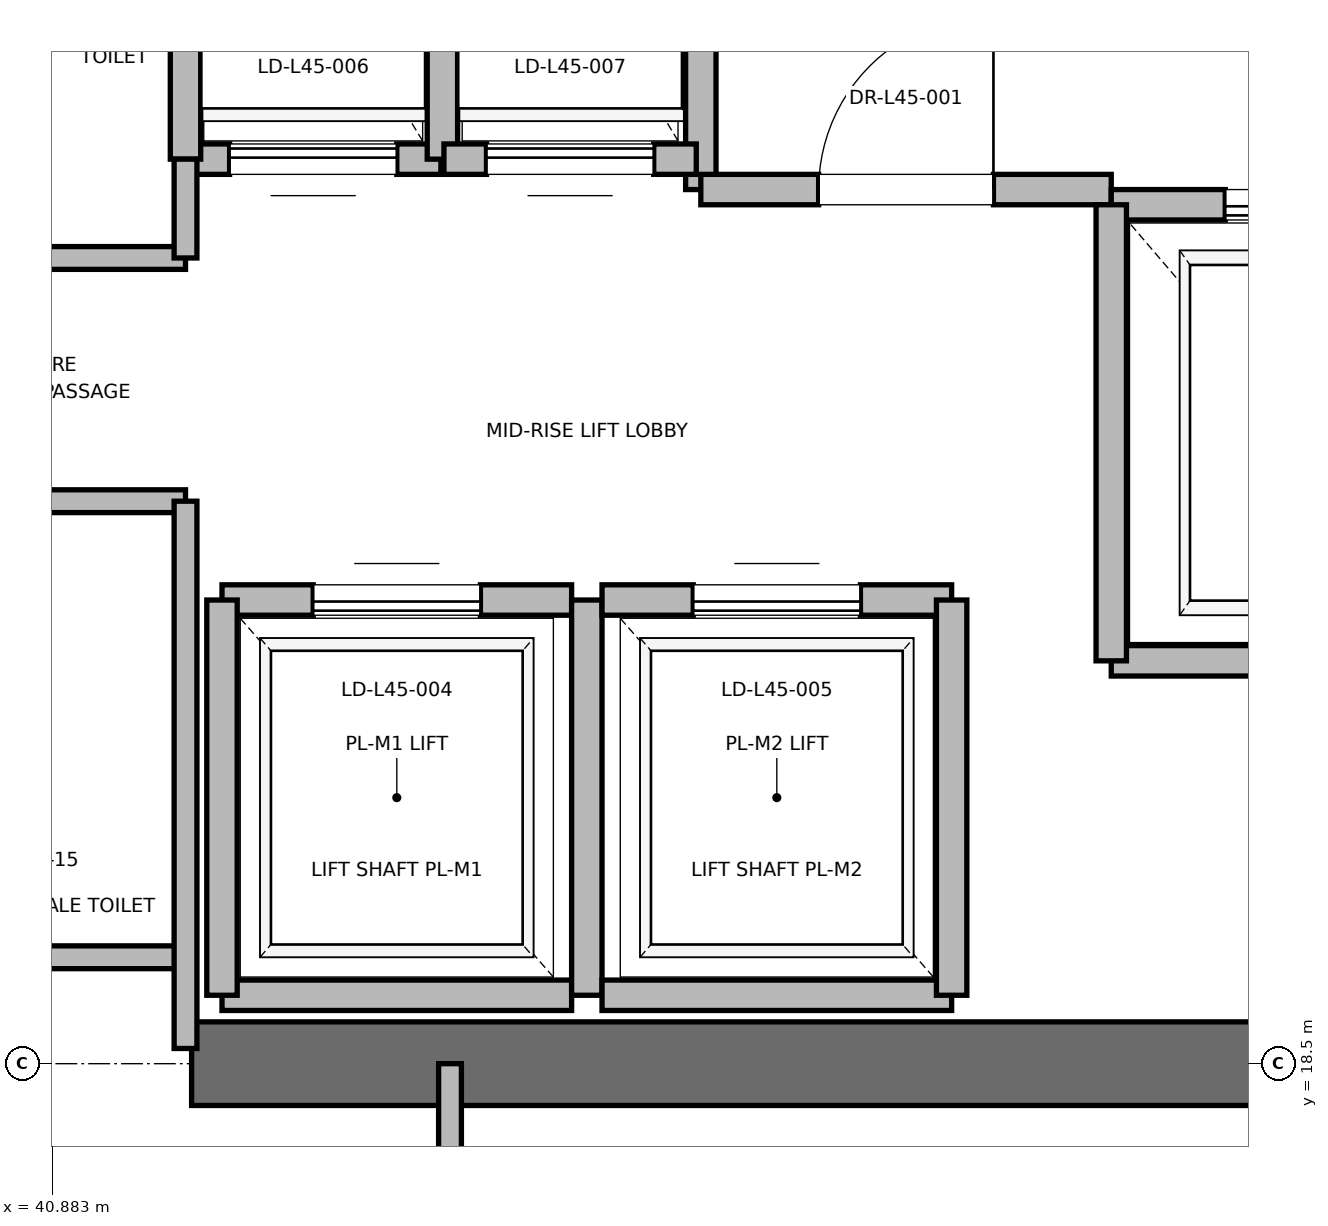
"""IFC4 building model, lengths in metres.
Left out: names, types, materials, properties, quantities, classifications, styles, units other than length and angle.
Written with IfcOpenShell. Run it as: python <this file> out.ifc"""

import sys

from ifc_helpers import new_model, si_unit, direction, frame, frame_2d, origin, place, context, subcontext, project, spatial, rectangle, extrude, element, fill, save


model = new_model("IFC4")
c1 = context("Model", 3, precision=1e-05, world=origin(), true_north=direction((0.0, 1.0)))
c2 = subcontext(c1, "Body", "Model", "MODEL_VIEW")
j1 = project(units=[si_unit("LENGTHUNIT", "METRE"), si_unit("PLANEANGLEUNIT", "RADIAN")], contexts=[c1])
p1 = place(None, origin())
s1 = spatial("IfcSite", under=j1, at=p1, CompositionType="ELEMENT")
p2 = place(p1, origin())
s2 = spatial("IfcBuilding", under=s1, at=p2, CompositionType="ELEMENT")
p3 = place(p2, frame((0.0, 0.0, 194.8)))
s3 = spatial("IfcBuildingStorey", under=s2, at=p3, CompositionType="ELEMENT", Elevation=194.8)
p4 = place(p3, frame((41.8, 18.5, 0.0), z_axis=(0.0, 0.0, 1.0), x_axis=(1.0, 0.0, 0.0)))
e1 = element("IfcWall", 1, at=p4, inside=s3, PredefinedType="SHEAR", context=c2, shape_type="SweptSolid", body=[
    extrude(rectangle(XDim=9.2, YDim=0.55, at=frame_2d((4.6, 0.0))), origin(), (0.0, 0.0, 1.0), 5.1),
])
p5 = place(p3, frame((45.15, 24.25, 0.0), z_axis=(0.0, 0.0, 1.0), x_axis=(0.0, 1.0, 0.0)))
e2 = element("IfcWall", 2, at=p5, inside=s3, PredefinedType="PARTITIONING", context=c2, shape_type="SweptSolid", body=[
    extrude(rectangle(XDim=3.37, YDim=0.2, at=frame_2d((1.685, 0.0))), origin(), (0.0, 0.0, 1.0), 5.1),
])
p6 = place(p3, frame((45.15, 24.25, 0.0), z_axis=(0.0, 0.0, 1.0), x_axis=(1.0, 0.0, 0.0)))
e3 = element("IfcWall", 3, at=p6, inside=s3, PredefinedType="PARTITIONING", context=c2, shape_type="SweptSolid", body=[
    extrude(rectangle(XDim=2.7, YDim=0.2, at=frame_2d((1.35, 0.0))), origin(), (0.0, 0.0, 1.0), 5.1),
])
p7 = place(p6, frame((0.775, 0.0, 0.0)))
e4 = element("IfcOpeningElement", 4, at=p7, cuts=e3, PredefinedType="OPENING", context=c2, shape_type="SweptSolid", body=[
    extrude(rectangle(XDim=1.15, YDim=2.2, at=frame_2d((0.575, 1.1))), frame((0.0, 0.1, 0.0), z_axis=(0.0, -1.0, 0.0), x_axis=(1.0, 0.0, 0.0)), (0.0, 0.0, 1.0), 0.2),
])
p8 = place(p3, frame((47.85, 21.15, 0.0), z_axis=(0.0, 0.0, 1.0), x_axis=(1.0, 0.0, 0.0)))
e5 = element("IfcWall", 5, at=p8, inside=s3, PredefinedType="SOLIDWALL", context=c2, shape_type="SweptSolid", body=[
    extrude(rectangle(XDim=2.6, YDim=0.2, at=frame_2d((1.3, 0.0))), origin(), (0.0, 0.0, 1.0), 5.1),
])
p9 = place(p3, frame((50.45, 24.15, 0.0), z_axis=(0.0, 0.0, 1.0), x_axis=(-1.0, 0.0, 0.0)))
e6 = element("IfcWall", 6, at=p9, inside=s3, PredefinedType="SOLIDWALL", context=c2, shape_type="SweptSolid", body=[
    extrude(rectangle(XDim=2.6, YDim=0.2, at=frame_2d((1.3, 0.0))), origin(), (0.0, 0.0, 1.0), 4.08),
])
p10 = place(p9, frame((0.75, 0.0, 0.0)))
e7 = element("IfcOpeningElement", 7, at=p10, cuts=e6, PredefinedType="OPENING", context=c2, shape_type="SweptSolid", body=[
    extrude(rectangle(XDim=1.1, YDim=2.2, at=frame_2d((0.55, 1.1))), frame((0.0, 0.1, 0.0), z_axis=(0.0, -1.0, 0.0), x_axis=(1.0, 0.0, 0.0)), (0.0, 0.0, 1.0), 0.2),
])
p11 = place(p3, frame((47.85, 24.15, 0.0), z_axis=(0.0, 0.0, 1.0), x_axis=(0.0, -1.0, 0.0)))
e8 = element("IfcWall", 8, at=p11, inside=s3, PredefinedType="SOLIDWALL", context=c2, shape_type="SweptSolid", body=[
    extrude(rectangle(XDim=3.0, YDim=0.2, at=frame_2d((1.5, 0.0))), origin(), (0.0, 0.0, 1.0), 5.1),
])
p12 = place(p3, frame((42.0, 18.95, 0.0), z_axis=(0.0, 0.0, 1.0), x_axis=(1.0, 0.0, 0.0)))
e9 = element("IfcWall", 9, at=p12, inside=s3, PredefinedType="SOLIDWALL", context=c2, shape_type="SweptSolid", body=[
    extrude(rectangle(XDim=2.3, YDim=0.2, at=frame_2d((1.15, 0.0))), origin(), (0.0, 0.0, 1.0), 4.08),
])
p13 = place(p3, frame((44.3, 21.55, 0.0), z_axis=(0.0, 0.0, 1.0), x_axis=(-1.0, 0.0, 0.0)))
e10 = element("IfcWall", 10, at=p13, inside=s3, PredefinedType="SOLIDWALL", context=c2, shape_type="SweptSolid", body=[
    extrude(rectangle(XDim=2.3, YDim=0.2, at=frame_2d((1.15, 0.0))), origin(), (0.0, 0.0, 1.0), 5.1),
])
p14 = place(p13, frame((0.6, 0.0, 0.0)))
e11 = element("IfcOpeningElement", 11, at=p14, cuts=e10, PredefinedType="OPENING", context=c2, shape_type="SweptSolid", body=[
    extrude(rectangle(XDim=1.1, YDim=2.2, at=frame_2d((0.55, 1.1))), frame((0.0, 0.1, 0.0), z_axis=(0.0, -1.0, 0.0), x_axis=(1.0, 0.0, 0.0)), (0.0, 0.0, 1.0), 0.2),
])
p15 = place(p3, frame((42.0, 21.55, 0.0), z_axis=(0.0, 0.0, 1.0), x_axis=(0.0, -1.0, 0.0)))
e12 = element("IfcWall", 12, at=p15, inside=s3, PredefinedType="SOLIDWALL", context=c2, shape_type="SweptSolid", body=[
    extrude(rectangle(XDim=2.6, YDim=0.2, at=frame_2d((1.3, 0.0))), origin(), (0.0, 0.0, 1.0), 4.08),
])
p16 = place(p3, frame((44.4, 18.95, 0.0), z_axis=(0.0, 0.0, 1.0), x_axis=(0.0, 1.0, 0.0)))
e13 = element("IfcWall", 13, at=p16, inside=s3, PredefinedType="SOLIDWALL", context=c2, shape_type="SweptSolid", body=[
    extrude(rectangle(XDim=2.6, YDim=0.2, at=frame_2d((1.3, 0.0))), origin(), (0.0, 0.0, 1.0), 5.1),
])
p17 = place(p3, frame((44.5, 18.95, 0.0), z_axis=(0.0, 0.0, 1.0), x_axis=(1.0, 0.0, 0.0)))
e14 = element("IfcWall", 14, at=p17, inside=s3, PredefinedType="SOLIDWALL", context=c2, shape_type="SweptSolid", body=[
    extrude(rectangle(XDim=2.3, YDim=0.2, at=frame_2d((1.15, 0.0))), origin(), (0.0, 0.0, 1.0), 5.1),
])
p18 = place(p3, frame((46.8, 21.55, 0.0), z_axis=(0.0, 0.0, 1.0), x_axis=(-1.0, 0.0, 0.0)))
e15 = element("IfcWall", 15, at=p18, inside=s3, PredefinedType="SOLIDWALL", context=c2, shape_type="SweptSolid", body=[
    extrude(rectangle(XDim=2.3, YDim=0.2, at=frame_2d((1.15, 0.0))), origin(), (0.0, 0.0, 1.0), 5.1),
])
p19 = place(p18, frame((0.6, 0.0, 0.0)))
e16 = element("IfcOpeningElement", 16, at=p19, cuts=e15, PredefinedType="OPENING", context=c2, shape_type="SweptSolid", body=[
    extrude(rectangle(XDim=1.1, YDim=2.2, at=frame_2d((0.55, 1.1))), frame((0.0, 0.1, 0.0), z_axis=(0.0, -1.0, 0.0), x_axis=(1.0, 0.0, 0.0)), (0.0, 0.0, 1.0), 0.2),
])
p20 = place(p3, frame((46.8, 18.95, 0.0), z_axis=(0.0, 0.0, 1.0), x_axis=(0.0, 1.0, 0.0)))
e17 = element("IfcWall", 17, at=p20, inside=s3, PredefinedType="SOLIDWALL", context=c2, shape_type="SweptSolid", body=[
    extrude(rectangle(XDim=2.6, YDim=0.2, at=frame_2d((1.3, 0.0))), origin(), (0.0, 0.0, 1.0), 5.1),
])
p21 = place(p3, frame((41.76, 24.45, 0.0), z_axis=(0.0, 0.0, 1.0), x_axis=(1.0, 0.0, 0.0)))
e18 = element("IfcWall", 18, at=p21, inside=s3, PredefinedType="SOLIDWALL", context=c2, shape_type="SweptSolid", body=[
    extrude(rectangle(XDim=1.68, YDim=0.2, at=frame_2d((0.84, 0.0))), origin(), (0.0, 0.0, 1.0), 5.1),
])
p22 = place(p21, frame((0.29, 0.0, 0.0)))
e19 = element("IfcOpeningElement", 19, at=p22, cuts=e18, PredefinedType="OPENING", context=c2, shape_type="SweptSolid", body=[
    extrude(rectangle(XDim=1.1, YDim=2.2, at=frame_2d((0.55, 1.1))), frame((0.0, 0.1, 0.0), z_axis=(0.0, -1.0, 0.0), x_axis=(1.0, 0.0, 0.0)), (0.0, 0.0, 1.0), 0.2),
])
for number, where, z_axis, x_axis in (
    (20, (41.76, 27.05, 0.0), (0.0, 0.0, 1.0), (0.0, -1.0, 0.0)),
    (21, (43.45, 24.45, 0.0), (0.0, 0.0, 1.0), (0.0, 1.0, 0.0)),
):
    element("IfcWall", number, at=place(p3, frame(where, z_axis=z_axis, x_axis=x_axis)), inside=s3, PredefinedType="SOLIDWALL", context=c2, shape_type="SweptSolid", body=[
        extrude(rectangle(XDim=2.6, YDim=0.2, at=frame_2d((1.3, 0.0))), origin(), (0.0, 0.0, 1.0), 5.1),
    ])
p23 = place(p3, frame((43.46, 24.45, 0.0), z_axis=(0.0, 0.0, 1.0), x_axis=(1.0, 0.0, 0.0)))
e22 = element("IfcWall", 22, at=p23, inside=s3, PredefinedType="SOLIDWALL", context=c2, shape_type="SweptSolid", body=[
    extrude(rectangle(XDim=1.66, YDim=0.2, at=frame_2d((0.83, 0.0))), origin(), (0.0, 0.0, 1.0), 5.1),
])
p24 = place(p23, frame((0.28, 0.0, 0.0)))
e23 = element("IfcOpeningElement", 23, at=p24, cuts=e22, PredefinedType="OPENING", context=c2, shape_type="SweptSolid", body=[
    extrude(rectangle(XDim=1.1, YDim=2.2, at=frame_2d((0.55, 1.1))), frame((0.0, 0.1, 0.0), z_axis=(0.0, -1.0, 0.0), x_axis=(1.0, 0.0, 0.0)), (0.0, 0.0, 1.0), 0.2),
])
for number, where, z_axis, x_axis in (
    (24, (39.95, 19.2, 0.0), (0.0, 0.0, 1.0), (1.0, 0.0, 0.0)),
    (25, (39.95, 22.2, 0.0), (0.0, 0.0, 1.0), (1.0, 0.0, 0.0)),
    (26, (39.95, 23.8, 0.0), (0.0, 0.0, 1.0), (1.0, 0.0, 0.0)),
):
    element("IfcWall", number, at=place(p3, frame(where, z_axis=z_axis, x_axis=x_axis)), inside=s3, PredefinedType="PARTITIONING", context=c2, shape_type="SweptSolid", body=[
        extrude(rectangle(XDim=1.81, YDim=0.15, at=frame_2d((0.905, 0.0))), origin(), (0.0, 0.0, 1.0), 2.85),
    ])
p25 = place(p3, frame((41.76, 18.6, 0.0), z_axis=(0.0, 0.0, 1.0), x_axis=(0.0, 1.0, 0.0)))
e27 = element("IfcWall", 27, at=p25, inside=s3, PredefinedType="PARTITIONING", context=c2, shape_type="SweptSolid", body=[
    extrude(rectangle(XDim=3.6, YDim=0.15, at=frame_2d((1.8, 0.0))), origin(), (0.0, 0.0, 1.0), 2.85),
])
p26 = place(p3, frame((41.76, 23.8, 0.0), z_axis=(0.0, 0.0, 1.0), x_axis=(0.0, 1.0, 0.0)))
e28 = element("IfcWall", 28, at=p26, inside=s3, PredefinedType="PARTITIONING", context=c2, shape_type="SweptSolid", body=[
    extrude(rectangle(XDim=0.65, YDim=0.15, at=frame_2d((0.325, 0.0))), origin(), (0.0, 0.0, 1.0), 2.85),
])
p27 = place(p3, frame((43.5, 15.8, 0.0), z_axis=(0.0, 0.0, 1.0), x_axis=(0.0, 1.0, 0.0)))
e29 = element("IfcWall", 29, at=p27, inside=s3, PredefinedType="PARTITIONING", context=c2, shape_type="SweptSolid", body=[
    extrude(rectangle(XDim=2.7, YDim=0.15, at=frame_2d((1.35, 0.0))), origin(), (0.0, 0.0, 1.0), 2.85),
])
p28 = place(p27, frame((0.875, 0.0, 0.0)))
e30 = element("IfcOpeningElement", 30, at=p28, cuts=e29, PredefinedType="OPENING", context=c2, shape_type="SweptSolid", body=[
    extrude(rectangle(XDim=0.95, YDim=2.15, at=frame_2d((0.475, 1.075))), frame((0.0, 0.075, 0.0), z_axis=(0.0, -1.0, 0.0), x_axis=(1.0, 0.0, 0.0)), (0.0, 0.0, 1.0), 0.15),
])
p29 = place(p7, origin())
e31 = element("IfcDoor", 31, at=p29, inside=s3, OperationType="SINGLE_SWING_RIGHT", PredefinedType="DOOR", context=c2, shape_type="SweptSolid", body=[
    extrude(rectangle(XDim=1.15, YDim=2.2, at=frame_2d((0.575, 1.1))), frame((0.0, 0.025, 0.0), z_axis=(0.0, -1.0, 0.0), x_axis=(1.0, 0.0, 0.0)), (0.0, 0.0, 1.0), 0.05),
])
fill(e4, e31)
p30 = place(p10, origin())
e32 = element("IfcDoor", 32, at=p30, inside=s3, OperationType="SLIDING_TO_RIGHT", PredefinedType="DOOR", context=c2, shape_type="SweptSolid", body=[
    extrude(rectangle(XDim=1.1, YDim=2.2, at=frame_2d((0.55, 1.1))), frame((0.0, 0.025, 0.0), z_axis=(0.0, -1.0, 0.0), x_axis=(1.0, 0.0, 0.0)), (0.0, 0.0, 1.0), 0.05),
])
fill(e7, e32)
p31 = place(p14, origin())
e33 = element("IfcDoor", 33, at=p31, inside=s3, OperationType="SLIDING_TO_RIGHT", PredefinedType="DOOR", context=c2, shape_type="SweptSolid", body=[
    extrude(rectangle(XDim=1.1, YDim=2.2, at=frame_2d((0.55, 1.1))), frame((0.0, 0.025, 0.0), z_axis=(0.0, -1.0, 0.0), x_axis=(1.0, 0.0, 0.0)), (0.0, 0.0, 1.0), 0.05),
])
fill(e11, e33)
p32 = place(p19, origin())
e34 = element("IfcDoor", 34, at=p32, inside=s3, OperationType="SLIDING_TO_RIGHT", PredefinedType="DOOR", context=c2, shape_type="SweptSolid", body=[
    extrude(rectangle(XDim=1.1, YDim=2.2, at=frame_2d((0.55, 1.1))), frame((0.0, 0.025, 0.0), z_axis=(0.0, -1.0, 0.0), x_axis=(1.0, 0.0, 0.0)), (0.0, 0.0, 1.0), 0.05),
])
fill(e16, e34)
p33 = place(p22, origin())
e35 = element("IfcDoor", 35, at=p33, inside=s3, OperationType="SLIDING_TO_RIGHT", PredefinedType="DOOR", context=c2, shape_type="SweptSolid", body=[
    extrude(rectangle(XDim=1.1, YDim=2.2, at=frame_2d((0.55, 1.1))), frame((0.0, 0.025, 0.0), z_axis=(0.0, -1.0, 0.0), x_axis=(1.0, 0.0, 0.0)), (0.0, 0.0, 1.0), 0.05),
])
fill(e19, e35)
p34 = place(p24, origin())
e36 = element("IfcDoor", 36, at=p34, inside=s3, OperationType="SLIDING_TO_RIGHT", PredefinedType="DOOR", context=c2, shape_type="SweptSolid", body=[
    extrude(rectangle(XDim=1.1, YDim=2.2, at=frame_2d((0.55, 1.1))), frame((0.0, 0.025, 0.0), z_axis=(0.0, -1.0, 0.0), x_axis=(1.0, 0.0, 0.0)), (0.0, 0.0, 1.0), 0.05),
])
fill(e23, e36)
save(model, sys.argv[1])
